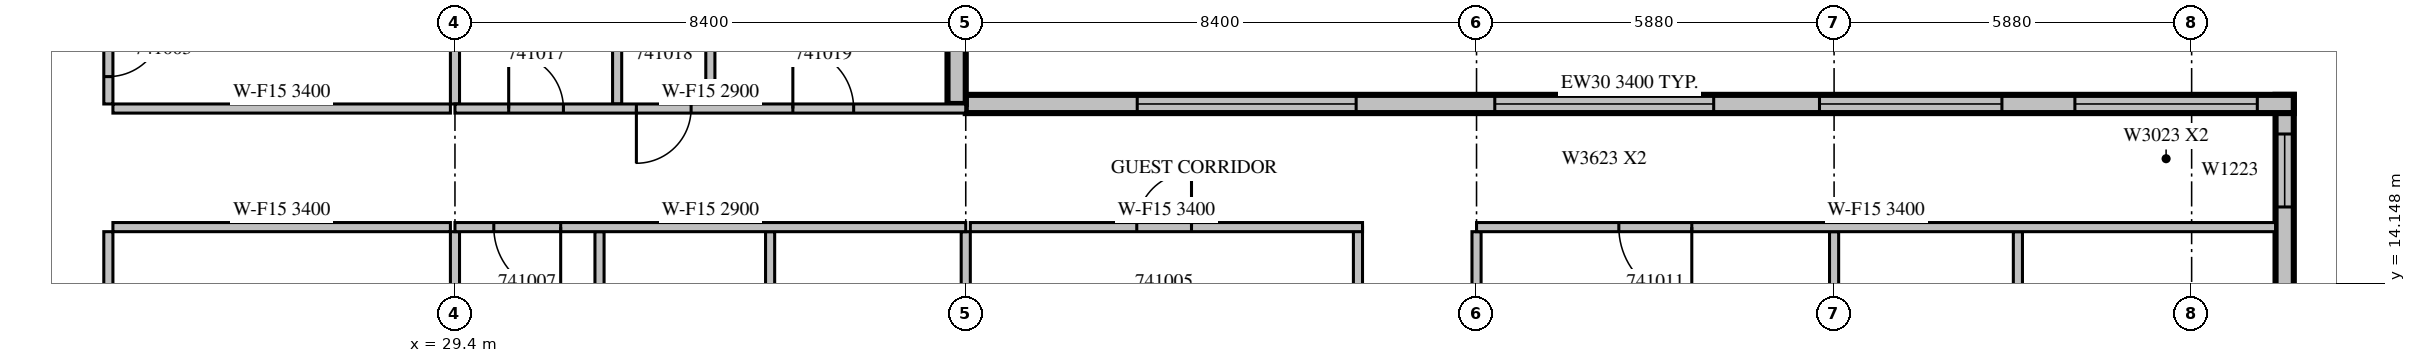
"""IFC4 building model, lengths in metres.
Left out: names, types, materials, properties, quantities, classifications, styles, units other than length and angle.
Written with IfcOpenShell. Run it as: python <this file> out.ifc"""

import sys

from ifc_helpers import new_model, si_unit, direction, frame, frame_2d, origin, place, context, subcontext, project, spatial, rectangle, extrude, source, transform, mapped, element, fill, save


model = new_model("IFC4")
c1 = context("Model", 3, precision=1e-05, world=origin(), true_north=direction((0.0, 1.0)))
c2 = subcontext(c1, "Body", "Model", "MODEL_VIEW")
j1 = project(units=[si_unit("LENGTHUNIT", "METRE"), si_unit("PLANEANGLEUNIT", "RADIAN")], contexts=[c1])
p1 = place(None, origin())
s1 = spatial("IfcSite", under=j1, at=p1, CompositionType="ELEMENT")
p2 = place(p1, origin())
s2 = spatial("IfcBuilding", under=s1, at=p2, CompositionType="ELEMENT")
p3 = place(p2, frame((0.0, 0.0, 189.2)))
s3 = spatial("IfcBuildingStorey", under=s2, at=p3, CompositionType="ELEMENT", Elevation=189.2)
m1 = source(origin(), c2, "Body", "SweptSolid", [
    extrude(rectangle(XDim=3.375, YDim=0.3, at=frame_2d((1.688, 0.0))), origin(), (0.0, 0.0, 1.0), 3.4),
])
p4 = place(p3, frame((59.49, 13.875, 0.0), z_axis=(0.0, 0.0, 1.0), x_axis=(0.0, 1.0, 0.0)))
e1 = element("IfcWall", 1, at=p4, inside=s3, PredefinedType="STANDARD", context=c2, shape_type="MappedRepresentation", body=[
    mapped(m1, transform((0.0, 0.0, 0.0), scale=1.0)),
])
m2 = source(origin(), c2, "Body", "SweptSolid", [
    extrude(rectangle(XDim=1.2, YDim=2.3, at=frame_2d((0.6, 1.15))), frame((0.0, 0.16, 0.0), z_axis=(0.0, -1.0, 0.0), x_axis=(1.0, 0.0, 0.0)), (0.0, 0.0, 1.0), 0.32),
])
p5 = place(p4, frame((1.531, 0.0, 0.6)))
e2 = element("IfcOpeningElement", 2, at=p5, cuts=e1, PredefinedType="OPENING", context=c2, shape_type="MappedRepresentation", body=[
    mapped(m2, transform((0.0, 0.0, 0.0), scale=1.0)),
])
m3 = source(origin(), c2, "Body", "SweptSolid", [
    extrude(rectangle(XDim=21.84, YDim=0.3, at=frame_2d((10.92, 0.0))), origin(), (0.0, 0.0, 1.0), 3.4),
])
p6 = place(p3, frame((59.64, 17.1, 0.0), z_axis=(0.0, 0.0, 1.0), x_axis=(-1.0, 0.0, 0.0)))
e3 = element("IfcWall", 3, at=p6, inside=s3, PredefinedType="STANDARD", context=c2, shape_type="MappedRepresentation", body=[
    mapped(m3, transform((0.0, 0.0, 0.0), scale=1.0)),
])
m4 = source(origin(), c2, "Body", "SweptSolid", [
    extrude(rectangle(XDim=3.0, YDim=2.3, at=frame_2d((1.5, 1.15))), frame((0.0, 0.16, 0.0), z_axis=(0.0, -1.0, 0.0), x_axis=(1.0, 0.0, 0.0)), (0.0, 0.0, 1.0), 0.32),
])
p7 = place(p6, frame((0.6, 0.0, 0.6)))
e4 = element("IfcOpeningElement", 4, at=p7, cuts=e3, PredefinedType="OPENING", context=c2, shape_type="MappedRepresentation", body=[
    mapped(m4, transform((0.0, 0.0, 0.0), scale=1.0)),
])
p8 = place(p6, frame((4.8, 0.0, 0.6)))
e5 = element("IfcOpeningElement", 5, at=p8, cuts=e3, PredefinedType="OPENING", context=c2, shape_type="MappedRepresentation", body=[
    mapped(m4, transform((0.0, 0.0, 0.0), scale=1.0)),
])
m5 = source(origin(), c2, "Body", "SweptSolid", [
    extrude(rectangle(XDim=3.6, YDim=2.3, at=frame_2d((1.8, 1.15))), frame((0.0, 0.16, 0.0), z_axis=(0.0, -1.0, 0.0), x_axis=(1.0, 0.0, 0.0)), (0.0, 0.0, 1.0), 0.32),
])
p9 = place(p6, frame((9.54, 0.0, 0.6)))
e6 = element("IfcOpeningElement", 6, at=p9, cuts=e3, PredefinedType="OPENING", context=c2, shape_type="MappedRepresentation", body=[
    mapped(m5, transform((0.0, 0.0, 0.0), scale=1.0)),
])
p10 = place(p6, frame((15.42, 0.0, 0.6)))
e7 = element("IfcOpeningElement", 7, at=p10, cuts=e3, PredefinedType="OPENING", context=c2, shape_type="MappedRepresentation", body=[
    mapped(m5, transform((0.0, 0.0, 0.0), scale=1.0)),
])
m6 = source(origin(), c2, "Body", "SweptSolid", [
    extrude(rectangle(XDim=3.0, YDim=0.3, at=frame_2d((1.5, 0.0))), origin(), (0.0, 0.0, 1.0), 3.4),
])
p11 = place(p3, frame((37.65, 17.1, 0.0), z_axis=(0.0, 0.0, 1.0), x_axis=(0.0, 1.0, 0.0)))
e8 = element("IfcWall", 8, at=p11, inside=s3, PredefinedType="STANDARD", context=c2, shape_type="MappedRepresentation", body=[
    mapped(m6, transform((0.0, 0.0, 0.0), scale=1.0)),
])
p12 = place(p11, frame((1.425, 0.0, 0.6)))
e9 = element("IfcOpeningElement", 9, at=p12, cuts=e8, PredefinedType="OPENING", context=c2, shape_type="MappedRepresentation", body=[
    mapped(m2, transform((0.0, 0.0, 0.0), scale=1.0)),
])
m7 = source(origin(), c2, "Body", "SweptSolid", [
    extrude(rectangle(XDim=11.525, YDim=0.15, at=frame_2d((5.763, 0.0))), origin(), (0.0, 0.0, 1.0), 2.4),
])
p13 = place(p3, frame((23.7, 15.0, 0.0), z_axis=(0.0, 0.0, 1.0), x_axis=(0.0, -1.0, 0.0)))
e10 = element("IfcWall", 10, at=p13, inside=s3, PredefinedType="PARTITIONING", context=c2, shape_type="MappedRepresentation", body=[
    mapped(m7, transform((0.0, 0.0, 0.0), scale=1.0)),
])
m8 = source(origin(), c2, "Body", "SweptSolid", [
    extrude(rectangle(XDim=0.9, YDim=2.1, at=frame_2d((0.45, 1.05))), frame((0.0, 0.085, 0.0), z_axis=(0.0, -1.0, 0.0), x_axis=(1.0, 0.0, 0.0)), (0.0, 0.0, 1.0), 0.17),
])
p14 = place(p13, frame((7.562, 0.0, 0.0)))
e11 = element("IfcOpeningElement", 11, at=p14, cuts=e10, PredefinedType="OPENING", context=c2, shape_type="MappedRepresentation", body=[
    mapped(m8, transform((0.0, 0.0, 0.0), scale=1.0)),
])
p15 = place(p13, frame((0.925, 0.0, 0.0)))
e12 = element("IfcOpeningElement", 12, at=p15, cuts=e10, PredefinedType="OPENING", context=c2, shape_type="MappedRepresentation", body=[
    mapped(m8, transform((0.0, 0.0, 0.0), scale=1.0)),
])
m9 = source(origin(), c2, "Body", "SweptSolid", [
    extrude(rectangle(XDim=3.6, YDim=0.15, at=frame_2d((1.8, 0.0))), origin(), (0.0, 0.0, 1.0), 3.4),
])
p16 = place(p3, frame((23.7, 20.7, 0.0), z_axis=(0.0, 0.0, 1.0), x_axis=(0.0, -1.0, 0.0)))
e13 = element("IfcWall", 13, at=p16, inside=s3, PredefinedType="PARTITIONING", context=c2, shape_type="MappedRepresentation", body=[
    mapped(m9, transform((0.0, 0.0, 0.0), scale=1.0)),
])
p17 = place(p16, frame((2.25, 0.0, 0.0)))
e14 = element("IfcOpeningElement", 14, at=p17, cuts=e13, PredefinedType="OPENING", context=c2, shape_type="MappedRepresentation", body=[
    mapped(m8, transform((0.0, 0.0, 0.0), scale=1.0)),
])
m10 = source(origin(), c2, "Body", "SweptSolid", [
    extrude(rectangle(XDim=5.55, YDim=0.15, at=frame_2d((2.775, 0.0))), origin(), (0.0, 0.0, 1.0), 3.4),
])
for number, where, z_axis, x_axis in (
    (15, (29.325, 15.075, 0.0), (0.0, 0.0, 1.0), (-1.0, 0.0, 0.0)),
    (16, (23.775, 17.025, 0.0), (0.0, 0.0, 1.0), (1.0, 0.0, 0.0)),
):
    element("IfcWall", number, at=place(p3, frame(where, z_axis=z_axis, x_axis=x_axis)), inside=s3, PredefinedType="PARTITIONING", context=c2, shape_type="MappedRepresentation", body=[
        mapped(m10, transform((0.0, 0.0, 0.0), scale=1.0)),
    ])
m11 = source(origin(), c2, "Body", "SweptSolid", [
    extrude(rectangle(XDim=4.051, YDim=0.15, at=frame_2d((2.026, 0.0))), origin(), (0.0, 0.0, 1.0), 3.4),
])
p18 = place(p3, frame((29.4, 10.949, 0.0), z_axis=(0.0, 0.0, 1.0), x_axis=(0.0, 1.0, 0.0)))
e17 = element("IfcWall", 17, at=p18, inside=s3, PredefinedType="PARTITIONING", context=c2, shape_type="MappedRepresentation", body=[
    mapped(m11, transform((0.0, 0.0, 0.0), scale=1.0)),
])
m12 = source(origin(), c2, "Body", "SweptSolid", [
    extrude(rectangle(XDim=3.001, YDim=0.15, at=frame_2d((1.5, 0.0))), origin(), (0.0, 0.0, 1.0), 3.4),
])
p19 = place(p3, frame((29.4, 17.1, 0.0), z_axis=(0.0, 0.0, 1.0), x_axis=(0.0, 1.0, 0.0)))
e18 = element("IfcWall", 18, at=p19, inside=s3, PredefinedType="PARTITIONING", context=c2, shape_type="MappedRepresentation", body=[
    mapped(m12, transform((0.0, 0.0, 0.0), scale=1.0)),
])
m13 = source(origin(), c2, "Body", "SweptSolid", [
    extrude(rectangle(XDim=3.575, YDim=0.15, at=frame_2d((1.788, 0.0))), origin(), (0.0, 0.0, 1.0), 3.4),
])
p20 = place(p3, frame((44.25, 11.5, 0.0), z_axis=(0.0, 0.0, 1.0), x_axis=(0.0, 1.0, 0.0)))
e19 = element("IfcWall", 19, at=p20, inside=s3, PredefinedType="PARTITIONING", context=c2, shape_type="MappedRepresentation", body=[
    mapped(m13, transform((0.0, 0.0, 0.0), scale=1.0)),
])
m14 = source(origin(), c2, "Body", "SweptSolid", [
    extrude(rectangle(XDim=6.45, YDim=0.15, at=frame_2d((3.225, 0.0))), origin(), (0.0, 0.0, 1.0), 3.4),
])
p21 = place(p3, frame((44.325, 15.075, 0.0), z_axis=(0.0, 0.0, 1.0), x_axis=(-1.0, 0.0, 0.0)))
e20 = element("IfcWall", 20, at=p21, inside=s3, PredefinedType="PARTITIONING", context=c2, shape_type="MappedRepresentation", body=[
    mapped(m14, transform((0.0, 0.0, 0.0), scale=1.0)),
])
p22 = place(p21, frame((2.812, 0.0, 0.0)))
e21 = element("IfcOpeningElement", 21, at=p22, cuts=e20, PredefinedType="OPENING", context=c2, shape_type="MappedRepresentation", body=[
    mapped(m8, transform((0.0, 0.0, 0.0), scale=1.0)),
])
m15 = source(origin(), c2, "Body", "SweptSolid", [
    extrude(rectangle(XDim=3.9, YDim=0.15, at=frame_2d((1.95, 0.0))), origin(), (0.0, 0.0, 1.0), 3.4),
])
for number, where, z_axis, x_axis in (
    (22, (31.777, 11.1, 0.0), (0.0, 0.0, 1.0), (0.0, 1.0, 0.0)),
    (23, (34.583, 11.1, 0.0), (0.0, 0.0, 1.0), (0.0, 1.0, 0.0)),
    (24, (37.8, 11.1, 0.0), (0.0, 0.0, 1.0), (0.0, 1.0, 0.0)),
    (25, (52.08, 11.1, 0.0), (0.0, 0.0, 1.0), (0.0, 1.0, 0.0)),
    (26, (55.103, 11.1, 0.0), (0.0, 0.0, 1.0), (0.0, 1.0, 0.0)),
    (27, (46.2, 11.1, 0.0), (0.0, 0.0, 1.0), (0.0, 1.0, 0.0)),
):
    element("IfcWall", number, at=place(p3, frame(where, z_axis=z_axis, x_axis=x_axis)), inside=s3, PredefinedType="PARTITIONING", context=c2, shape_type="MappedRepresentation", body=[
        mapped(m15, transform((0.0, 0.0, 0.0), scale=1.0)),
    ])
m16 = source(origin(), c2, "Body", "SweptSolid", [
    extrude(rectangle(XDim=3.6, YDim=0.15, at=frame_2d((1.8, 0.0))), origin(), (0.0, 0.0, 1.0), 2.4),
])
for number, where, z_axis, x_axis in (
    (28, (32.067, 20.7, 0.0), (0.0, 0.0, 1.0), (0.0, -1.0, 0.0)),
    (29, (33.6, 17.1, 0.0), (0.0, 0.0, 1.0), (0.0, 1.0, 0.0)),
):
    element("IfcWall", number, at=place(p3, frame(where, z_axis=z_axis, x_axis=x_axis)), inside=s3, PredefinedType="PARTITIONING", context=c2, shape_type="MappedRepresentation", body=[
        mapped(m16, transform((0.0, 0.0, 0.0), scale=1.0)),
    ])
m17 = source(origin(), c2, "Body", "SweptSolid", [
    extrude(rectangle(XDim=8.4, YDim=0.15, at=frame_2d((4.2, 0.0))), origin(), (0.0, 0.0, 1.0), 2.9),
])
p23 = place(p3, frame((37.8, 15.075, 0.0), z_axis=(0.0, 0.0, 1.0), x_axis=(-1.0, 0.0, 0.0)))
e30 = element("IfcWall", 30, at=p23, inside=s3, PredefinedType="PARTITIONING", context=c2, shape_type="MappedRepresentation", body=[
    mapped(m17, transform((0.0, 0.0, 0.0), scale=1.0)),
])
m18 = source(origin(), c2, "Body", "SweptSolid", [
    extrude(rectangle(XDim=1.1, YDim=2.1, at=frame_2d((0.55, 1.05))), frame((0.0, 0.085, 0.0), z_axis=(0.0, -1.0, 0.0), x_axis=(1.0, 0.0, 0.0)), (0.0, 0.0, 1.0), 0.17),
])
p24 = place(p23, frame((6.662, 0.0, 0.0)))
e31 = element("IfcOpeningElement", 31, at=p24, cuts=e30, PredefinedType="OPENING", context=c2, shape_type="MappedRepresentation", body=[
    mapped(m18, transform((0.0, 0.0, 0.0), scale=1.0)),
])
m19 = source(origin(), c2, "Body", "SweptSolid", [
    extrude(rectangle(XDim=13.14, YDim=0.15, at=frame_2d((6.57, 0.0))), origin(), (0.0, 0.0, 1.0), 3.4),
])
p25 = place(p3, frame((59.34, 15.075, 0.0), z_axis=(0.0, 0.0, 1.0), x_axis=(-1.0, 0.0, 0.0)))
e32 = element("IfcWall", 32, at=p25, inside=s3, PredefinedType="PARTITIONING", context=c2, shape_type="MappedRepresentation", body=[
    mapped(m19, transform((0.0, 0.0, 0.0), scale=1.0)),
])
m20 = source(origin(), c2, "Body", "SweptSolid", [
    extrude(rectangle(XDim=1.2, YDim=2.1, at=frame_2d((0.6, 1.05))), frame((0.0, 0.085, 0.0), z_axis=(0.0, -1.0, 0.0), x_axis=(1.0, 0.0, 0.0)), (0.0, 0.0, 1.0), 0.17),
])
p26 = place(p25, frame((9.6, 0.0, 0.0)))
e33 = element("IfcOpeningElement", 33, at=p26, cuts=e32, PredefinedType="OPENING", context=c2, shape_type="MappedRepresentation", body=[
    mapped(m20, transform((0.0, 0.0, 0.0), scale=1.0)),
])
p27 = place(p3, frame((29.4, 17.025, 0.0), z_axis=(0.0, 0.0, 1.0), x_axis=(1.0, 0.0, 0.0)))
e34 = element("IfcWall", 34, at=p27, inside=s3, PredefinedType="PARTITIONING", context=c2, shape_type="MappedRepresentation", body=[
    mapped(m17, transform((0.0, 0.0, 0.0), scale=1.0)),
])
p28 = place(p27, frame((0.883, 0.0, 0.0)))
e35 = element("IfcOpeningElement", 35, at=p28, cuts=e34, PredefinedType="OPENING", context=c2, shape_type="MappedRepresentation", body=[
    mapped(m8, transform((0.0, 0.0, 0.0), scale=1.0)),
])
p29 = place(p27, frame((2.983, 0.0, 0.0)))
e36 = element("IfcOpeningElement", 36, at=p29, cuts=e34, PredefinedType="OPENING", context=c2, shape_type="MappedRepresentation", body=[
    mapped(m8, transform((0.0, 0.0, 0.0), scale=1.0)),
])
m21 = source(origin(), c2, "Body", "SweptSolid", [
    extrude(rectangle(XDim=1.0, YDim=2.1, at=frame_2d((0.5, 1.05))), frame((0.0, 0.085, 0.0), z_axis=(0.0, -1.0, 0.0), x_axis=(1.0, 0.0, 0.0)), (0.0, 0.0, 1.0), 0.17),
])
p30 = place(p27, frame((5.557, 0.0, 0.0)))
e37 = element("IfcOpeningElement", 37, at=p30, cuts=e34, PredefinedType="OPENING", context=c2, shape_type="MappedRepresentation", body=[
    mapped(m21, transform((0.0, 0.0, 0.0), scale=1.0)),
])
m22 = source(origin(), c2, "Body", "SweptSolid", [
    extrude(rectangle(XDim=1.2, YDim=2.3, at=frame_2d((0.6, 1.15))), frame((0.0, 0.03, 0.0), z_axis=(0.0, -1.0, 0.0), x_axis=(1.0, 0.0, 0.0)), (0.0, 0.0, 1.0), 0.06),
])
p31 = place(p5, origin())
e38 = element("IfcWindow", 38, at=p31, inside=s3, PartitioningType="SINGLE_PANEL", PredefinedType="WINDOW", context=c2, shape_type="MappedRepresentation", body=[
    mapped(m22, transform((0.0, 0.0, 0.0), scale=1.0)),
])
fill(e2, e38)
m23 = source(origin(), c2, "Body", "SweptSolid", [
    extrude(rectangle(XDim=3.0, YDim=2.3, at=frame_2d((1.5, 1.15))), frame((0.0, 0.03, 0.0), z_axis=(0.0, -1.0, 0.0), x_axis=(1.0, 0.0, 0.0)), (0.0, 0.0, 1.0), 0.06),
])
p32 = place(p7, origin())
e39 = element("IfcWindow", 39, at=p32, inside=s3, PartitioningType="SINGLE_PANEL", PredefinedType="WINDOW", context=c2, shape_type="MappedRepresentation", body=[
    mapped(m23, transform((0.0, 0.0, 0.0), scale=1.0)),
])
fill(e4, e39)
p33 = place(p8, origin())
e40 = element("IfcWindow", 40, at=p33, inside=s3, PartitioningType="SINGLE_PANEL", PredefinedType="WINDOW", context=c2, shape_type="MappedRepresentation", body=[
    mapped(m23, transform((0.0, 0.0, 0.0), scale=1.0)),
])
fill(e5, e40)
m24 = source(origin(), c2, "Body", "SweptSolid", [
    extrude(rectangle(XDim=3.6, YDim=2.3, at=frame_2d((1.8, 1.15))), frame((0.0, 0.03, 0.0), z_axis=(0.0, -1.0, 0.0), x_axis=(1.0, 0.0, 0.0)), (0.0, 0.0, 1.0), 0.06),
])
p34 = place(p9, origin())
e41 = element("IfcWindow", 41, at=p34, inside=s3, PartitioningType="SINGLE_PANEL", PredefinedType="WINDOW", context=c2, shape_type="MappedRepresentation", body=[
    mapped(m24, transform((0.0, 0.0, 0.0), scale=1.0)),
])
fill(e6, e41)
p35 = place(p10, origin())
e42 = element("IfcWindow", 42, at=p35, inside=s3, PartitioningType="SINGLE_PANEL", PredefinedType="WINDOW", context=c2, shape_type="MappedRepresentation", body=[
    mapped(m24, transform((0.0, 0.0, 0.0), scale=1.0)),
])
fill(e7, e42)
m25 = source(origin(), c2, "Body", "SweptSolid", [
    extrude(rectangle(XDim=0.9, YDim=2.1, at=frame_2d((0.45, 1.05))), frame((0.0, 0.025, 0.0), z_axis=(0.0, -1.0, 0.0), x_axis=(1.0, 0.0, 0.0)), (0.0, 0.0, 1.0), 0.05),
])
p36 = place(p17, origin())
e43 = element("IfcDoor", 43, at=p36, inside=s3, OperationType="SINGLE_SWING_LEFT", PredefinedType="DOOR", context=c2, shape_type="MappedRepresentation", body=[
    mapped(m25, transform((0.0, 0.0, 0.0), scale=1.0)),
])
fill(e14, e43)
p37 = place(p22, origin())
e44 = element("IfcDoor", 44, at=p37, inside=s3, OperationType="SINGLE_SWING_RIGHT", PredefinedType="DOOR", context=c2, shape_type="MappedRepresentation", body=[
    mapped(m25, transform((0.0, 0.0, 0.0), scale=1.0)),
])
fill(e21, e44)
m26 = source(origin(), c2, "Body", "SweptSolid", [
    extrude(rectangle(XDim=1.1, YDim=2.1, at=frame_2d((0.55, 1.05))), frame((0.0, 0.025, 0.0), z_axis=(0.0, -1.0, 0.0), x_axis=(1.0, 0.0, 0.0)), (0.0, 0.0, 1.0), 0.05),
])
p38 = place(p24, origin())
e45 = element("IfcDoor", 45, at=p38, inside=s3, OperationType="SINGLE_SWING_LEFT", PredefinedType="DOOR", context=c2, shape_type="MappedRepresentation", body=[
    mapped(m26, transform((0.0, 0.0, 0.0), scale=1.0)),
])
fill(e31, e45)
m27 = source(origin(), c2, "Body", "SweptSolid", [
    extrude(rectangle(XDim=1.2, YDim=2.1, at=frame_2d((0.6, 1.05))), frame((0.0, 0.025, 0.0), z_axis=(0.0, -1.0, 0.0), x_axis=(1.0, 0.0, 0.0)), (0.0, 0.0, 1.0), 0.05),
])
p39 = place(p26, origin())
e46 = element("IfcDoor", 46, at=p39, inside=s3, OperationType="SINGLE_SWING_LEFT", PredefinedType="DOOR", context=c2, shape_type="MappedRepresentation", body=[
    mapped(m27, transform((0.0, 0.0, 0.0), scale=1.0)),
])
fill(e33, e46)
p40 = place(p28, origin())
e47 = element("IfcDoor", 47, at=p40, inside=s3, OperationType="SINGLE_SWING_LEFT", PredefinedType="DOOR", context=c2, shape_type="MappedRepresentation", body=[
    mapped(m25, transform((0.0, 0.0, 0.0), scale=1.0)),
])
fill(e35, e47)
p41 = place(p29, origin())
e48 = element("IfcDoor", 48, at=p41, inside=s3, OperationType="SINGLE_SWING_RIGHT", PredefinedType="DOOR", context=c2, shape_type="MappedRepresentation", body=[
    mapped(m25, transform((0.0, 0.0, 0.0), scale=1.0)),
])
fill(e36, e48)
m28 = source(origin(), c2, "Body", "SweptSolid", [
    extrude(rectangle(XDim=1.0, YDim=2.1, at=frame_2d((0.5, 1.05))), frame((0.0, 0.025, 0.0), z_axis=(0.0, -1.0, 0.0), x_axis=(1.0, 0.0, 0.0)), (0.0, 0.0, 1.0), 0.05),
])
p42 = place(p30, origin())
e49 = element("IfcDoor", 49, at=p42, inside=s3, OperationType="SINGLE_SWING_LEFT", PredefinedType="DOOR", context=c2, shape_type="MappedRepresentation", body=[
    mapped(m28, transform((0.0, 0.0, 0.0), scale=1.0)),
])
fill(e37, e49)
save(model, sys.argv[1])
